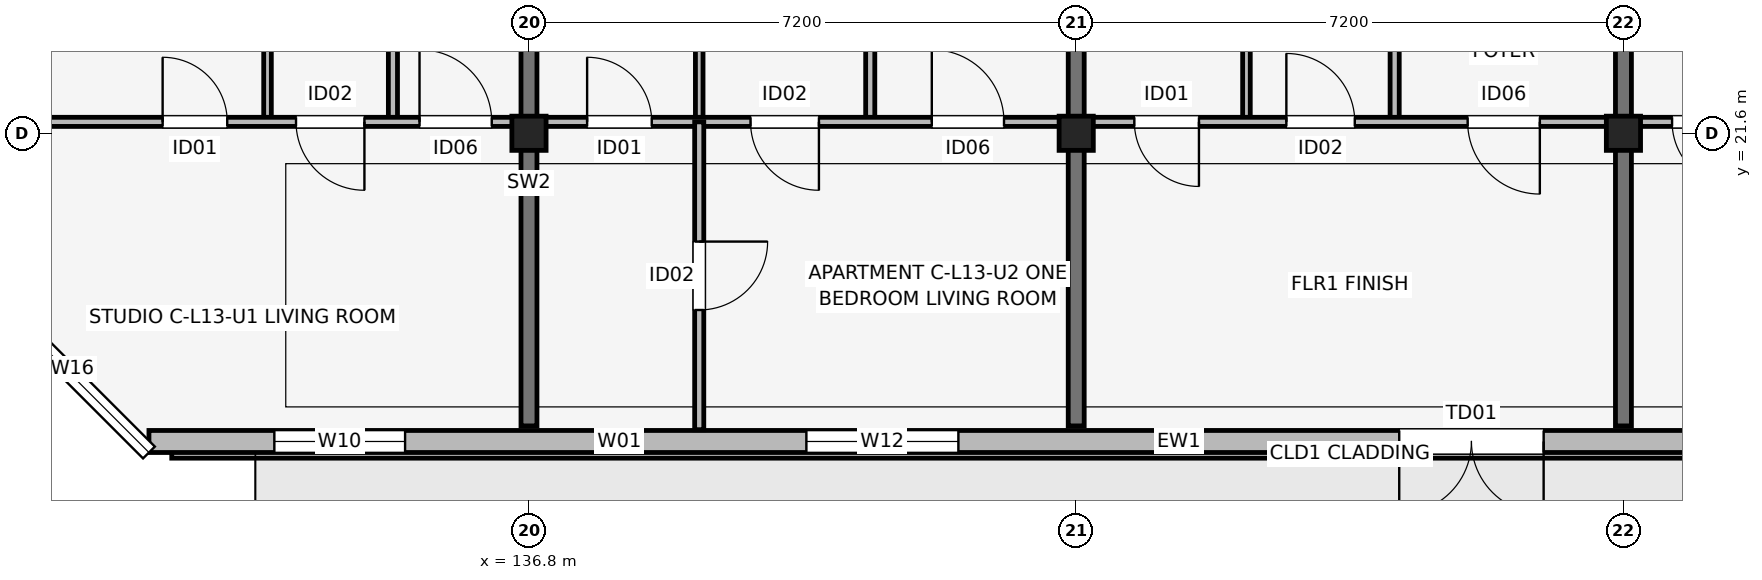
"""IFC4 building model, lengths in metres.
Left out: names, types, materials, properties, quantities, classifications, styles, units other than length and angle.
Written with IfcOpenShell. Run it as: python <this file> out.ifc"""

import sys

from ifc_helpers import new_model, si_unit, direction, frame, frame_2d, origin, origin_2d, place, context, subcontext, project, spatial, rectangle, extrude, element, fill, save


model = new_model("IFC4")
c1 = context("Model", 3, precision=1e-05, world=origin(), true_north=direction((0.0, 1.0)))
c2 = subcontext(c1, "Body", "Model", "MODEL_VIEW")
j1 = project(units=[si_unit("LENGTHUNIT", "METRE"), si_unit("PLANEANGLEUNIT", "RADIAN")], contexts=[c1])
p1 = place(None, origin())
s1 = spatial("IfcSite", under=j1, at=p1, CompositionType="ELEMENT")
p2 = place(p1, origin())
s2 = spatial("IfcBuilding", under=s1, at=p2, CompositionType="ELEMENT")
p3 = place(p2, frame((0.0, 0.0, 43.35)))
s3 = spatial("IfcBuildingStorey", under=s2, at=p3, CompositionType="ELEMENT", Elevation=43.35)
for number, where, z_axis, x_axis in (
    (1, (136.8, 21.6, 0.0), (0.0, 0.0, 1.0), (1.0, 0.0, 0.0)),
    (2, (144.0, 21.6, 0.0), (0.0, 0.0, 1.0), (1.0, 0.0, 0.0)),
    (3, (151.2, 21.6, 0.0), (0.0, 0.0, 1.0), (1.0, 0.0, 0.0)),
):
    element("IfcColumn", number, at=place(p3, frame(where, z_axis=z_axis, x_axis=x_axis)), inside=s3, PredefinedType="COLUMN", context=c2, shape_type="SweptSolid", body=[
        extrude(rectangle(XDim=0.45, YDim=0.45, at=origin_2d()), origin(), (0.0, 0.0, 1.0), 3.15),
    ])
for number, where, z_axis, x_axis in (
    (4, (136.8, 17.75, 0.0), (0.0, 0.0, 1.0), (0.0, 1.0, 0.0)),
    (5, (144.0, 17.75, 0.0), (0.0, 0.0, 1.0), (0.0, 1.0, 0.0)),
    (6, (151.2, 17.75, 0.0), (0.0, 0.0, 1.0), (0.0, 1.0, 0.0)),
):
    element("IfcWall", number, at=place(p3, frame(where, z_axis=z_axis, x_axis=x_axis)), inside=s3, PredefinedType="SHEAR", context=c2, shape_type="SweptSolid", body=[
        extrude(rectangle(XDim=6.4, YDim=0.21, at=frame_2d((3.2, 0.0))), origin(), (0.0, 0.0, 1.0), 3.15),
    ])
p4 = place(p3, frame((131.8, 17.545, 0.0), z_axis=(0.0, 0.0, 1.0), x_axis=(1.0, 0.0, 0.0)))
e7 = element("IfcWall", 7, at=p4, inside=s3, PredefinedType="SOLIDWALL", context=c2, shape_type="SweptSolid", body=[
    extrude(rectangle(XDim=31.6, YDim=0.29, at=frame_2d((15.8, 0.0))), origin(), (0.0, 0.0, 1.0), 2.48),
])
p5 = place(p4, frame((18.35, 0.0, 0.0), z_axis=(0.0, 0.0, 1.0), x_axis=(-1.0, 0.0, 0.0)))
e8 = element("IfcOpeningElement", 8, at=p5, cuts=e7, PredefinedType="OPENING", context=c2, shape_type="SweptSolid", body=[
    extrude(rectangle(XDim=1.9, YDim=2.2, at=frame_2d((0.95, 1.1))), frame((0.0, 0.155, 0.0), z_axis=(0.0, -1.0, 0.0), x_axis=(1.0, 0.0, 0.0)), (0.0, 0.0, 1.0), 0.31),
])
p6 = place(p4, frame((1.65, 0.0, 0.7)))
e9 = element("IfcOpeningElement", 9, at=p6, cuts=e7, PredefinedType="OPENING", context=c2, shape_type="SweptSolid", body=[
    extrude(rectangle(XDim=1.72, YDim=1.6, at=frame_2d((0.86, 0.8))), frame((0.0, 0.155, 0.0), z_axis=(0.0, -1.0, 0.0), x_axis=(1.0, 0.0, 0.0)), (0.0, 0.0, 1.0), 0.31),
])
p7 = place(p4, frame((5.89, 0.0, 0.75)))
e10 = element("IfcOpeningElement", 10, at=p7, cuts=e7, PredefinedType="OPENING", context=c2, shape_type="SweptSolid", body=[
    extrude(rectangle(XDim=0.6, YDim=1.25, at=frame_2d((0.3, 0.625))), frame((0.0, 0.155, 0.0), z_axis=(0.0, -1.0, 0.0), x_axis=(1.0, 0.0, 0.0)), (0.0, 0.0, 1.0), 0.31),
])
p8 = place(p4, frame((8.65, 0.0, 0.7)))
e11 = element("IfcOpeningElement", 11, at=p8, cuts=e7, PredefinedType="OPENING", context=c2, shape_type="SweptSolid", body=[
    extrude(rectangle(XDim=2.0, YDim=1.65, at=frame_2d((1.0, 0.825))), frame((0.0, 0.155, 0.0), z_axis=(0.0, -1.0, 0.0), x_axis=(1.0, 0.0, 0.0)), (0.0, 0.0, 1.0), 0.31),
])
p9 = place(p4, frame((21.925, 0.0, 0.7)))
e12 = element("IfcOpeningElement", 12, at=p9, cuts=e7, PredefinedType="OPENING", context=c2, shape_type="SweptSolid", body=[
    extrude(rectangle(XDim=2.15, YDim=1.65, at=frame_2d((1.075, 0.825))), frame((0.0, 0.155, 0.0), z_axis=(0.0, -1.0, 0.0), x_axis=(1.0, 0.0, 0.0)), (0.0, 0.0, 1.0), 0.31),
])
p10 = place(p4, frame((27.175, 0.0, 0.75)))
e13 = element("IfcOpeningElement", 13, at=p10, cuts=e7, PredefinedType="OPENING", context=c2, shape_type="SweptSolid", body=[
    extrude(rectangle(XDim=0.98, YDim=1.45, at=frame_2d((0.49, 0.725))), frame((0.0, 0.155, 0.0), z_axis=(0.0, -1.0, 0.0), x_axis=(1.0, 0.0, 0.0)), (0.0, 0.0, 1.0), 0.31),
])
p11 = place(p4, frame((29.465, 0.0, 0.75)))
e14 = element("IfcOpeningElement", 14, at=p11, cuts=e7, PredefinedType="OPENING", context=c2, shape_type="SweptSolid", body=[
    extrude(rectangle(XDim=1.1, YDim=1.5, at=frame_2d((0.55, 0.75))), frame((0.0, 0.155, 0.0), z_axis=(0.0, -1.0, 0.0), x_axis=(1.0, 0.0, 0.0)), (0.0, 0.0, 1.0), 0.31),
])
p12 = place(p3, frame((133.36, 21.75, 0.0), z_axis=(0.0, 0.0, 1.0), x_axis=(0.0, 1.0, 0.0)))
e15 = element("IfcWall", 15, at=p12, inside=s3, PredefinedType="PARTITIONING", context=c2, shape_type="SweptSolid", body=[
    extrude(rectangle(XDim=2.55, YDim=0.1, at=frame_2d((1.275, 0.0))), origin(), (0.0, 0.0, 1.0), 2.38),
])
p13 = place(p3, frame((135.01, 21.75, 0.0), z_axis=(0.0, 0.0, 1.0), x_axis=(0.0, 1.0, 0.0)))
e16 = element("IfcWall", 16, at=p13, inside=s3, PredefinedType="PARTITIONING", context=c2, shape_type="SweptSolid", body=[
    extrude(rectangle(XDim=2.55, YDim=0.12, at=frame_2d((1.275, 0.0))), origin(), (0.0, 0.0, 1.0), 2.38),
])
p14 = place(p3, frame((129.74, 21.75, 0.0), z_axis=(0.0, 0.0, 1.0), x_axis=(1.0, 0.0, 0.0)))
e17 = element("IfcWall", 17, at=p14, inside=s3, PredefinedType="PARTITIONING", context=c2, shape_type="SweptSolid", body=[
    extrude(rectangle(XDim=6.92, YDim=0.12, at=frame_2d((3.46, 0.0))), origin(), (0.0, 0.0, 1.0), 2.38),
])
p15 = place(p14, frame((2.24, 0.0, 0.0)))
e18 = element("IfcOpeningElement", 18, at=p15, cuts=e17, PredefinedType="OPENING", context=c2, shape_type="SweptSolid", body=[
    extrude(rectangle(XDim=0.85, YDim=2.08, at=frame_2d((0.425, 1.04))), frame((0.0, 0.07, 0.0), z_axis=(0.0, -1.0, 0.0), x_axis=(1.0, 0.0, 0.0)), (0.0, 0.0, 1.0), 0.14),
])
p16 = place(p14, frame((4.895, 0.0, 0.0), z_axis=(0.0, 0.0, 1.0), x_axis=(-1.0, 0.0, 0.0)))
e19 = element("IfcOpeningElement", 19, at=p16, cuts=e17, PredefinedType="OPENING", context=c2, shape_type="SweptSolid", body=[
    extrude(rectangle(XDim=0.9, YDim=2.08, at=frame_2d((0.45, 1.04))), frame((0.0, 0.07, 0.0), z_axis=(0.0, -1.0, 0.0), x_axis=(1.0, 0.0, 0.0)), (0.0, 0.0, 1.0), 0.14),
])
p17 = place(p14, frame((5.62, 0.0, 0.0)))
e20 = element("IfcOpeningElement", 20, at=p17, cuts=e17, PredefinedType="OPENING", context=c2, shape_type="SweptSolid", body=[
    extrude(rectangle(XDim=0.95, YDim=2.08, at=frame_2d((0.475, 1.04))), frame((0.0, 0.07, 0.0), z_axis=(0.0, -1.0, 0.0), x_axis=(1.0, 0.0, 0.0)), (0.0, 0.0, 1.0), 0.14),
])
p18 = place(p3, frame((139.04, 21.75, 0.0), z_axis=(0.0, 0.0, 1.0), x_axis=(0.0, 1.0, 0.0)))
e21 = element("IfcWall", 21, at=p18, inside=s3, PredefinedType="PARTITIONING", context=c2, shape_type="SweptSolid", body=[
    extrude(rectangle(XDim=2.55, YDim=0.1, at=frame_2d((1.275, 0.0))), origin(), (0.0, 0.0, 1.0), 2.38),
])
p19 = place(p3, frame((141.29, 21.75, 0.0), z_axis=(0.0, 0.0, 1.0), x_axis=(0.0, 1.0, 0.0)))
e22 = element("IfcWall", 22, at=p19, inside=s3, PredefinedType="PARTITIONING", context=c2, shape_type="SweptSolid", body=[
    extrude(rectangle(XDim=2.55, YDim=0.12, at=frame_2d((1.275, 0.0))), origin(), (0.0, 0.0, 1.0), 2.38),
])
p20 = place(p3, frame((136.94, 21.75, 0.0), z_axis=(0.0, 0.0, 1.0), x_axis=(1.0, 0.0, 0.0)))
e23 = element("IfcWall", 23, at=p20, inside=s3, PredefinedType="PARTITIONING", context=c2, shape_type="SweptSolid", body=[
    extrude(rectangle(XDim=6.92, YDim=0.12, at=frame_2d((3.46, 0.0))), origin(), (0.0, 0.0, 1.0), 2.38),
])
p21 = place(p20, frame((0.625, 0.0, 0.0)))
e24 = element("IfcOpeningElement", 24, at=p21, cuts=e23, PredefinedType="OPENING", context=c2, shape_type="SweptSolid", body=[
    extrude(rectangle(XDim=0.85, YDim=2.08, at=frame_2d((0.425, 1.04))), frame((0.0, 0.07, 0.0), z_axis=(0.0, -1.0, 0.0), x_axis=(1.0, 0.0, 0.0)), (0.0, 0.0, 1.0), 0.14),
])
p22 = place(p20, frame((3.675, 0.0, 0.0), z_axis=(0.0, 0.0, 1.0), x_axis=(-1.0, 0.0, 0.0)))
e25 = element("IfcOpeningElement", 25, at=p22, cuts=e23, PredefinedType="OPENING", context=c2, shape_type="SweptSolid", body=[
    extrude(rectangle(XDim=0.9, YDim=2.08, at=frame_2d((0.45, 1.04))), frame((0.0, 0.07, 0.0), z_axis=(0.0, -1.0, 0.0), x_axis=(1.0, 0.0, 0.0)), (0.0, 0.0, 1.0), 0.14),
])
p23 = place(p20, frame((5.16, 0.0, 0.0)))
e26 = element("IfcOpeningElement", 26, at=p23, cuts=e23, PredefinedType="OPENING", context=c2, shape_type="SweptSolid", body=[
    extrude(rectangle(XDim=0.95, YDim=2.08, at=frame_2d((0.475, 1.04))), frame((0.0, 0.07, 0.0), z_axis=(0.0, -1.0, 0.0), x_axis=(1.0, 0.0, 0.0)), (0.0, 0.0, 1.0), 0.14),
])
p24 = place(p3, frame((139.04, 17.7, 0.0), z_axis=(0.0, 0.0, 1.0), x_axis=(0.0, 1.0, 0.0)))
e27 = element("IfcWall", 27, at=p24, inside=s3, PredefinedType="PARTITIONING", context=c2, shape_type="SweptSolid", body=[
    extrude(rectangle(XDim=4.05, YDim=0.12, at=frame_2d((2.025, 0.0))), origin(), (0.0, 0.0, 1.0), 2.38),
])
p25 = place(p24, frame((2.475, 0.0, 0.0), z_axis=(0.0, 0.0, 1.0), x_axis=(-1.0, 0.0, 0.0)))
e28 = element("IfcOpeningElement", 28, at=p25, cuts=e27, PredefinedType="OPENING", context=c2, shape_type="SweptSolid", body=[
    extrude(rectangle(XDim=0.9, YDim=2.08, at=frame_2d((0.45, 1.04))), frame((0.0, 0.07, 0.0), z_axis=(0.0, -1.0, 0.0), x_axis=(1.0, 0.0, 0.0)), (0.0, 0.0, 1.0), 0.14),
])
p26 = place(p3, frame((146.24, 21.75, 0.0), z_axis=(0.0, 0.0, 1.0), x_axis=(0.0, 1.0, 0.0)))
e29 = element("IfcWall", 29, at=p26, inside=s3, PredefinedType="PARTITIONING", context=c2, shape_type="SweptSolid", body=[
    extrude(rectangle(XDim=2.55, YDim=0.1, at=frame_2d((1.275, 0.0))), origin(), (0.0, 0.0, 1.0), 2.38),
])
p27 = place(p3, frame((148.19, 21.75, 0.0), z_axis=(0.0, 0.0, 1.0), x_axis=(0.0, 1.0, 0.0)))
e30 = element("IfcWall", 30, at=p27, inside=s3, PredefinedType="PARTITIONING", context=c2, shape_type="SweptSolid", body=[
    extrude(rectangle(XDim=2.55, YDim=0.12, at=frame_2d((1.275, 0.0))), origin(), (0.0, 0.0, 1.0), 2.38),
])
p28 = place(p3, frame((144.14, 21.75, 0.0), z_axis=(0.0, 0.0, 1.0), x_axis=(1.0, 0.0, 0.0)))
e31 = element("IfcWall", 31, at=p28, inside=s3, PredefinedType="PARTITIONING", context=c2, shape_type="SweptSolid", body=[
    extrude(rectangle(XDim=6.92, YDim=0.12, at=frame_2d((3.46, 0.0))), origin(), (0.0, 0.0, 1.0), 2.38),
])
p29 = place(p28, frame((1.475, 0.0, 0.0), z_axis=(0.0, 0.0, 1.0), x_axis=(-1.0, 0.0, 0.0)))
e32 = element("IfcOpeningElement", 32, at=p29, cuts=e31, PredefinedType="OPENING", context=c2, shape_type="SweptSolid", body=[
    extrude(rectangle(XDim=0.85, YDim=2.08, at=frame_2d((0.425, 1.04))), frame((0.0, 0.07, 0.0), z_axis=(0.0, -1.0, 0.0), x_axis=(1.0, 0.0, 0.0)), (0.0, 0.0, 1.0), 0.14),
])
p30 = place(p28, frame((2.625, 0.0, 0.0)))
e33 = element("IfcOpeningElement", 33, at=p30, cuts=e31, PredefinedType="OPENING", context=c2, shape_type="SweptSolid", body=[
    extrude(rectangle(XDim=0.9, YDim=2.08, at=frame_2d((0.45, 1.04))), frame((0.0, 0.07, 0.0), z_axis=(0.0, -1.0, 0.0), x_axis=(1.0, 0.0, 0.0)), (0.0, 0.0, 1.0), 0.14),
])
p31 = place(p28, frame((5.96, 0.0, 0.0), z_axis=(0.0, 0.0, 1.0), x_axis=(-1.0, 0.0, 0.0)))
e34 = element("IfcOpeningElement", 34, at=p31, cuts=e31, PredefinedType="OPENING", context=c2, shape_type="SweptSolid", body=[
    extrude(rectangle(XDim=0.95, YDim=2.08, at=frame_2d((0.475, 1.04))), frame((0.0, 0.07, 0.0), z_axis=(0.0, -1.0, 0.0), x_axis=(1.0, 0.0, 0.0)), (0.0, 0.0, 1.0), 0.14),
])
p32 = place(p3, frame((151.34, 21.75, 0.0), z_axis=(0.0, 0.0, 1.0), x_axis=(1.0, 0.0, 0.0)))
e35 = element("IfcWall", 35, at=p32, inside=s3, PredefinedType="PARTITIONING", context=c2, shape_type="SweptSolid", body=[
    extrude(rectangle(XDim=6.92, YDim=0.12, at=frame_2d((3.46, 0.0))), origin(), (0.0, 0.0, 1.0), 2.38),
])
p33 = place(p32, frame((1.35, 0.0, 0.0), z_axis=(0.0, 0.0, 1.0), x_axis=(-1.0, 0.0, 0.0)))
e36 = element("IfcOpeningElement", 36, at=p33, cuts=e35, PredefinedType="OPENING", context=c2, shape_type="SweptSolid", body=[
    extrude(rectangle(XDim=0.85, YDim=2.08, at=frame_2d((0.425, 1.04))), frame((0.0, 0.07, 0.0), z_axis=(0.0, -1.0, 0.0), x_axis=(1.0, 0.0, 0.0)), (0.0, 0.0, 1.0), 0.14),
])
p34 = place(p32, frame((2.375, 0.0, 0.0)))
e37 = element("IfcOpeningElement", 37, at=p34, cuts=e35, PredefinedType="OPENING", context=c2, shape_type="SweptSolid", body=[
    extrude(rectangle(XDim=0.9, YDim=2.08, at=frame_2d((0.45, 1.04))), frame((0.0, 0.07, 0.0), z_axis=(0.0, -1.0, 0.0), x_axis=(1.0, 0.0, 0.0)), (0.0, 0.0, 1.0), 0.14),
])
p35 = place(p32, frame((5.835, 0.0, 0.0), z_axis=(0.0, 0.0, 1.0), x_axis=(-1.0, 0.0, 0.0)))
e38 = element("IfcOpeningElement", 38, at=p35, cuts=e35, PredefinedType="OPENING", context=c2, shape_type="SweptSolid", body=[
    extrude(rectangle(XDim=0.95, YDim=2.08, at=frame_2d((0.475, 1.04))), frame((0.0, 0.07, 0.0), z_axis=(0.0, -1.0, 0.0), x_axis=(1.0, 0.0, 0.0)), (0.0, 0.0, 1.0), 0.14),
])
p36 = place(p5, origin())
e39 = element("IfcDoor", 39, at=p36, inside=s3, OperationType="DOUBLE_DOOR_SINGLE_SWING", PredefinedType="DOOR", context=c2, shape_type="SweptSolid", body=[
    extrude(rectangle(XDim=1.9, YDim=2.2, at=frame_2d((0.95, 1.1))), frame((0.0, 0.025, 0.0), z_axis=(0.0, -1.0, 0.0), x_axis=(1.0, 0.0, 0.0)), (0.0, 0.0, 1.0), 0.05),
])
fill(e8, e39)
p37 = place(p6, origin())
e40 = element("IfcWindow", 40, at=p37, inside=s3, PartitioningType="SINGLE_PANEL", PredefinedType="WINDOW", context=c2, shape_type="SweptSolid", body=[
    extrude(rectangle(XDim=1.72, YDim=1.6, at=frame_2d((0.86, 0.8))), frame((0.0, 0.03, 0.0), z_axis=(0.0, -1.0, 0.0), x_axis=(1.0, 0.0, 0.0)), (0.0, 0.0, 1.0), 0.06),
])
fill(e9, e40)
p38 = place(p7, origin())
e41 = element("IfcWindow", 41, at=p38, inside=s3, PartitioningType="SINGLE_PANEL", PredefinedType="WINDOW", context=c2, shape_type="SweptSolid", body=[
    extrude(rectangle(XDim=0.6, YDim=1.25, at=frame_2d((0.3, 0.625))), frame((0.0, 0.03, 0.0), z_axis=(0.0, -1.0, 0.0), x_axis=(1.0, 0.0, 0.0)), (0.0, 0.0, 1.0), 0.06),
])
fill(e10, e41)
p39 = place(p8, origin())
e42 = element("IfcWindow", 42, at=p39, inside=s3, PartitioningType="SINGLE_PANEL", PredefinedType="WINDOW", context=c2, shape_type="SweptSolid", body=[
    extrude(rectangle(XDim=2.0, YDim=1.65, at=frame_2d((1.0, 0.825))), frame((0.0, 0.03, 0.0), z_axis=(0.0, -1.0, 0.0), x_axis=(1.0, 0.0, 0.0)), (0.0, 0.0, 1.0), 0.06),
])
fill(e11, e42)
p40 = place(p15, origin())
e43 = element("IfcDoor", 43, at=p40, inside=s3, OperationType="SINGLE_SWING_LEFT", PredefinedType="DOOR", context=c2, shape_type="SweptSolid", body=[
    extrude(rectangle(XDim=0.85, YDim=2.08, at=frame_2d((0.425, 1.04))), frame((0.0, 0.025, 0.0), z_axis=(0.0, -1.0, 0.0), x_axis=(1.0, 0.0, 0.0)), (0.0, 0.0, 1.0), 0.05),
])
fill(e18, e43)
p41 = place(p16, origin())
e44 = element("IfcDoor", 44, at=p41, inside=s3, OperationType="SINGLE_SWING_RIGHT", PredefinedType="DOOR", context=c2, shape_type="SweptSolid", body=[
    extrude(rectangle(XDim=0.9, YDim=2.08, at=frame_2d((0.45, 1.04))), frame((0.0, 0.025, 0.0), z_axis=(0.0, -1.0, 0.0), x_axis=(1.0, 0.0, 0.0)), (0.0, 0.0, 1.0), 0.05),
])
fill(e19, e44)
p42 = place(p17, origin())
e45 = element("IfcDoor", 45, at=p42, inside=s3, OperationType="SINGLE_SWING_LEFT", PredefinedType="DOOR", context=c2, shape_type="SweptSolid", body=[
    extrude(rectangle(XDim=0.95, YDim=2.08, at=frame_2d((0.475, 1.04))), frame((0.0, 0.025, 0.0), z_axis=(0.0, -1.0, 0.0), x_axis=(1.0, 0.0, 0.0)), (0.0, 0.0, 1.0), 0.05),
])
fill(e20, e45)
p43 = place(p21, origin())
e46 = element("IfcDoor", 46, at=p43, inside=s3, OperationType="SINGLE_SWING_LEFT", PredefinedType="DOOR", context=c2, shape_type="SweptSolid", body=[
    extrude(rectangle(XDim=0.85, YDim=2.08, at=frame_2d((0.425, 1.04))), frame((0.0, 0.025, 0.0), z_axis=(0.0, -1.0, 0.0), x_axis=(1.0, 0.0, 0.0)), (0.0, 0.0, 1.0), 0.05),
])
fill(e24, e46)
p44 = place(p22, origin())
e47 = element("IfcDoor", 47, at=p44, inside=s3, OperationType="SINGLE_SWING_RIGHT", PredefinedType="DOOR", context=c2, shape_type="SweptSolid", body=[
    extrude(rectangle(XDim=0.9, YDim=2.08, at=frame_2d((0.45, 1.04))), frame((0.0, 0.025, 0.0), z_axis=(0.0, -1.0, 0.0), x_axis=(1.0, 0.0, 0.0)), (0.0, 0.0, 1.0), 0.05),
])
fill(e25, e47)
p45 = place(p23, origin())
e48 = element("IfcDoor", 48, at=p45, inside=s3, OperationType="SINGLE_SWING_LEFT", PredefinedType="DOOR", context=c2, shape_type="SweptSolid", body=[
    extrude(rectangle(XDim=0.95, YDim=2.08, at=frame_2d((0.475, 1.04))), frame((0.0, 0.025, 0.0), z_axis=(0.0, -1.0, 0.0), x_axis=(1.0, 0.0, 0.0)), (0.0, 0.0, 1.0), 0.05),
])
fill(e26, e48)
p46 = place(p25, origin())
e49 = element("IfcDoor", 49, at=p46, inside=s3, OperationType="SINGLE_SWING_RIGHT", PredefinedType="DOOR", context=c2, shape_type="SweptSolid", body=[
    extrude(rectangle(XDim=0.9, YDim=2.08, at=frame_2d((0.45, 1.04))), frame((0.0, 0.025, 0.0), z_axis=(0.0, -1.0, 0.0), x_axis=(1.0, 0.0, 0.0)), (0.0, 0.0, 1.0), 0.05),
])
fill(e28, e49)
p47 = place(p29, origin())
e50 = element("IfcDoor", 50, at=p47, inside=s3, OperationType="SINGLE_SWING_RIGHT", PredefinedType="DOOR", context=c2, shape_type="SweptSolid", body=[
    extrude(rectangle(XDim=0.85, YDim=2.08, at=frame_2d((0.425, 1.04))), frame((0.0, 0.025, 0.0), z_axis=(0.0, -1.0, 0.0), x_axis=(1.0, 0.0, 0.0)), (0.0, 0.0, 1.0), 0.05),
])
fill(e32, e50)
p48 = place(p30, origin())
e51 = element("IfcDoor", 51, at=p48, inside=s3, OperationType="SINGLE_SWING_LEFT", PredefinedType="DOOR", context=c2, shape_type="SweptSolid", body=[
    extrude(rectangle(XDim=0.9, YDim=2.08, at=frame_2d((0.45, 1.04))), frame((0.0, 0.025, 0.0), z_axis=(0.0, -1.0, 0.0), x_axis=(1.0, 0.0, 0.0)), (0.0, 0.0, 1.0), 0.05),
])
fill(e33, e51)
p49 = place(p31, origin())
e52 = element("IfcDoor", 52, at=p49, inside=s3, OperationType="SINGLE_SWING_RIGHT", PredefinedType="DOOR", context=c2, shape_type="SweptSolid", body=[
    extrude(rectangle(XDim=0.95, YDim=2.08, at=frame_2d((0.475, 1.04))), frame((0.0, 0.025, 0.0), z_axis=(0.0, -1.0, 0.0), x_axis=(1.0, 0.0, 0.0)), (0.0, 0.0, 1.0), 0.05),
])
fill(e34, e52)
p50 = place(p33, origin())
e53 = element("IfcDoor", 53, at=p50, inside=s3, OperationType="SINGLE_SWING_RIGHT", PredefinedType="DOOR", context=c2, shape_type="SweptSolid", body=[
    extrude(rectangle(XDim=0.85, YDim=2.08, at=frame_2d((0.425, 1.04))), frame((0.0, 0.025, 0.0), z_axis=(0.0, -1.0, 0.0), x_axis=(1.0, 0.0, 0.0)), (0.0, 0.0, 1.0), 0.05),
])
fill(e36, e53)
save(model, sys.argv[1])
